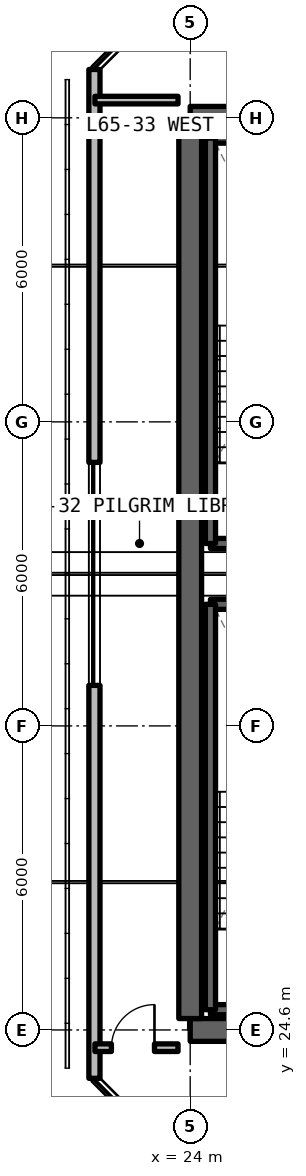
"""IFC4 building model, lengths in metres.
Left out: names, types, materials, properties, quantities, classifications, styles, units other than length and angle.
Written with IfcOpenShell. Run it as: python <this file> out.ifc"""

import sys

from ifc_helpers import new_model, si_unit, direction, frame, frame_2d, origin, place, context, subcontext, project, spatial, rectangle, extrude, element, fill, save


model = new_model("IFC4")
c1 = context("Model", 3, precision=1e-05, world=origin(), true_north=direction((0.0, 1.0)))
c2 = subcontext(c1, "Body", "Model", "MODEL_VIEW")
j1 = project(units=[si_unit("LENGTHUNIT", "METRE"), si_unit("PLANEANGLEUNIT", "RADIAN")], contexts=[c1])
p1 = place(None, origin())
s1 = spatial("IfcSite", under=j1, at=p1, CompositionType="ELEMENT")
p2 = place(p1, origin())
s2 = spatial("IfcBuilding", under=s1, at=p2, CompositionType="ELEMENT")
p3 = place(p2, frame((0.0, 0.0, 232.65)))
s3 = spatial("IfcBuildingStorey", under=s2, at=p3, CompositionType="ELEMENT", Elevation=232.65)
p4 = place(p3, frame((24.0, 24.6, 0.0), z_axis=(0.0, 0.0, 1.0), x_axis=(1.0, 0.0, 0.0)))
e1 = element("IfcWall", 1, at=p4, inside=s3, PredefinedType="SHEAR", context=c2, shape_type="SweptSolid", body=[
    extrude(rectangle(XDim=12.0, YDim=0.45, at=frame_2d((6.0, 0.0))), origin(), (0.0, 0.0, 1.0), 3.3),
])
p5 = place(p4, frame((7.2, 0.0, 0.0)))
e2 = element("IfcOpeningElement", 2, at=p5, cuts=e1, PredefinedType="OPENING", context=c2, shape_type="SweptSolid", body=[
    extrude(rectangle(XDim=1.0, YDim=2.15, at=frame_2d((0.5, 1.075))), frame((0.0, 0.235, 0.0), z_axis=(0.0, -1.0, 0.0), x_axis=(1.0, 0.0, 0.0)), (0.0, 0.0, 1.0), 0.47),
])
p6 = place(p3, frame((36.0, 42.6, 0.0), z_axis=(0.0, 0.0, 1.0), x_axis=(-1.0, 0.0, 0.0)))
e3 = element("IfcWall", 3, at=p6, inside=s3, PredefinedType="SHEAR", context=c2, shape_type="SweptSolid", body=[
    extrude(rectangle(XDim=12.0, YDim=0.45, at=frame_2d((6.0, 0.0))), origin(), (0.0, 0.0, 1.0), 3.3),
])
p7 = place(p6, frame((3.8, 0.0, 0.0)))
e4 = element("IfcOpeningElement", 4, at=p7, cuts=e3, PredefinedType="OPENING", context=c2, shape_type="SweptSolid", body=[
    extrude(rectangle(XDim=1.0, YDim=2.15, at=frame_2d((0.5, 1.075))), frame((0.0, 0.235, 0.0), z_axis=(0.0, -1.0, 0.0), x_axis=(1.0, 0.0, 0.0)), (0.0, 0.0, 1.0), 0.47),
])
p8 = place(p3, frame((24.0, 24.825, 0.0), z_axis=(0.0, 0.0, 1.0), x_axis=(0.0, 1.0, 0.0)))
e5 = element("IfcWall", 5, at=p8, inside=s3, PredefinedType="SHEAR", context=c2, shape_type="SweptSolid", body=[
    extrude(rectangle(XDim=17.55, YDim=0.45, at=frame_2d((8.775, 0.0))), origin(), (0.0, 0.0, 1.0), 3.3),
])
p9 = place(p3, frame((22.11, 43.554, 0.0), z_axis=(0.0, 0.0, 1.0), x_axis=(0.0, -1.0, 0.0)))
e6 = element("IfcWall", 6, at=p9, inside=s3, PredefinedType="SOLIDWALL", context=c2, shape_type="SweptSolid", body=[
    extrude(rectangle(XDim=19.909, YDim=0.22, at=frame_2d((9.955, 0.0))), origin(), (0.0, 0.0, 1.0), 3.08),
])
p10 = place(p9, frame((7.754, 0.0, 0.78)))
e7 = element("IfcOpeningElement", 7, at=p10, cuts=e6, PredefinedType="OPENING", context=c2, shape_type="SweptSolid", body=[
    extrude(rectangle(XDim=4.4, YDim=1.66, at=frame_2d((2.2, 0.83))), frame((0.0, 0.12, 0.0), z_axis=(0.0, -1.0, 0.0), x_axis=(1.0, 0.0, 0.0)), (0.0, 0.0, 1.0), 0.24),
])
p11 = place(p3, frame((22.12, 24.25, 0.0), z_axis=(0.0, 0.0, 1.0), x_axis=(1.0, 0.0, 0.0)))
e8 = element("IfcWall", 8, at=p11, inside=s3, PredefinedType="SOLIDWALL", context=c2, shape_type="SweptSolid", body=[
    extrude(rectangle(XDim=1.64, YDim=0.15, at=frame_2d((0.82, 0.0))), origin(), (0.0, 0.0, 1.0), 2.35),
])
p12 = place(p11, frame((0.325, 0.0, 0.0)))
e9 = element("IfcOpeningElement", 9, at=p12, cuts=e8, PredefinedType="OPENING", context=c2, shape_type="SweptSolid", body=[
    extrude(rectangle(XDim=0.85, YDim=2.1, at=frame_2d((0.425, 1.05))), frame((0.0, 0.085, 0.0), z_axis=(0.0, -1.0, 0.0), x_axis=(1.0, 0.0, 0.0)), (0.0, 0.0, 1.0), 0.17),
])
p13 = place(p3, frame((22.12, 42.95, 0.0), z_axis=(0.0, 0.0, 1.0), x_axis=(1.0, 0.0, 0.0)))
e10 = element("IfcWall", 10, at=p13, inside=s3, PredefinedType="SOLIDWALL", context=c2, shape_type="SweptSolid", body=[
    extrude(rectangle(XDim=1.64, YDim=0.15, at=frame_2d((0.82, 0.0))), origin(), (0.0, 0.0, 1.0), 2.35),
])
for number, where, z_axis, x_axis in (
    (11, (24.4, 25.0, 0.0), (0.0, 0.0, 1.0), (1.0, 0.0, 0.0)),
    (12, (27.8, 33.0, 0.0), (0.0, 0.0, 1.0), (-1.0, 0.0, 0.0)),
):
    element("IfcWall", number, at=place(p3, frame(where, z_axis=z_axis, x_axis=x_axis)), inside=s3, PredefinedType="SOLIDWALL", context=c2, shape_type="SweptSolid", body=[
        extrude(rectangle(XDim=3.4, YDim=0.2, at=frame_2d((1.7, 0.0))), origin(), (0.0, 0.0, 1.0), 3.3),
    ])
p14 = place(p3, frame((24.4, 33.0, 0.0), z_axis=(0.0, 0.0, 1.0), x_axis=(0.0, -1.0, 0.0)))
e13 = element("IfcWall", 13, at=p14, inside=s3, PredefinedType="SOLIDWALL", context=c2, shape_type="SweptSolid", body=[
    extrude(rectangle(XDim=8.0, YDim=0.2, at=frame_2d((4.0, 0.0))), origin(), (0.0, 0.0, 1.0), 3.3),
])
for number, where, z_axis, x_axis in (
    (14, (24.4, 34.2, 0.0), (0.0, 0.0, 1.0), (1.0, 0.0, 0.0)),
    (15, (27.8, 42.2, 0.0), (0.0, 0.0, 1.0), (-1.0, 0.0, 0.0)),
):
    element("IfcWall", number, at=place(p3, frame(where, z_axis=z_axis, x_axis=x_axis)), inside=s3, PredefinedType="SOLIDWALL", context=c2, shape_type="SweptSolid", body=[
        extrude(rectangle(XDim=3.4, YDim=0.2, at=frame_2d((1.7, 0.0))), origin(), (0.0, 0.0, 1.0), 3.3),
    ])
p15 = place(p3, frame((24.4, 42.2, 0.0), z_axis=(0.0, 0.0, 1.0), x_axis=(0.0, -1.0, 0.0)))
e16 = element("IfcWall", 16, at=p15, inside=s3, PredefinedType="SOLIDWALL", context=c2, shape_type="SweptSolid", body=[
    extrude(rectangle(XDim=8.0, YDim=0.2, at=frame_2d((4.0, 0.0))), origin(), (0.0, 0.0, 1.0), 3.3),
])
p16 = place(p10, origin())
e17 = element("IfcWindow", 17, at=p16, inside=s3, PartitioningType="SINGLE_PANEL", PredefinedType="WINDOW", context=c2, shape_type="SweptSolid", body=[
    extrude(rectangle(XDim=4.4, YDim=1.66, at=frame_2d((2.2, 0.83))), frame((0.0, 0.03, 0.0), z_axis=(0.0, -1.0, 0.0), x_axis=(1.0, 0.0, 0.0)), (0.0, 0.0, 1.0), 0.06),
])
fill(e7, e17)
p17 = place(p12, origin())
e18 = element("IfcDoor", 18, at=p17, inside=s3, OperationType="SINGLE_SWING_RIGHT", PredefinedType="DOOR", context=c2, shape_type="SweptSolid", body=[
    extrude(rectangle(XDim=0.85, YDim=2.1, at=frame_2d((0.425, 1.05))), frame((0.0, 0.025, 0.0), z_axis=(0.0, -1.0, 0.0), x_axis=(1.0, 0.0, 0.0)), (0.0, 0.0, 1.0), 0.05),
])
fill(e9, e18)
save(model, sys.argv[1])
